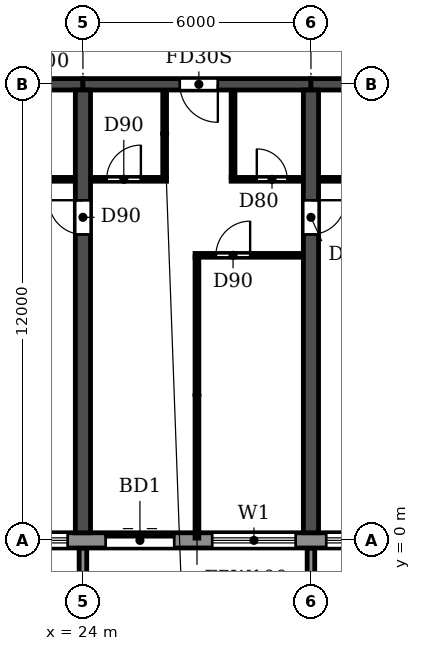
"""IFC4 building model, lengths in metres.
Left out: names, types, materials, properties, quantities, classifications, styles, units other than length and angle.
Written with IfcOpenShell. Run it as: python <this file> out.ifc"""

import sys

from ifc_helpers import new_model, si_unit, direction, frame, frame_2d, origin, place, context, subcontext, project, spatial, polyline, rectangle, outline, extrude, source, transform, mapped, element, fill, save


model = new_model("IFC4")
c1 = context("Model", 3, precision=1e-05, world=origin(), true_north=direction((0.0, 1.0)))
c2 = subcontext(c1, "Body", "Model", "MODEL_VIEW")
j1 = project(units=[si_unit("LENGTHUNIT", "METRE"), si_unit("PLANEANGLEUNIT", "RADIAN")], contexts=[c1])
p1 = place(None, origin())
s1 = spatial("IfcSite", under=j1, at=p1, CompositionType="ELEMENT")
p2 = place(p1, origin())
s2 = spatial("IfcBuilding", under=s1, at=p2, CompositionType="ELEMENT")
p3 = place(p2, frame((0.0, 0.0, 43.2)))
s3 = spatial("IfcBuildingStorey", under=s2, at=p3, CompositionType="ELEMENT", Elevation=43.2)
p4 = place(p3, frame((24.0, 0.2, 0.0), z_axis=(0.0, 0.0, 1.0), x_axis=(0.0, 1.0, 0.0)))
e1 = element("IfcWall", 1, at=p4, inside=s3, PredefinedType="SHEAR", context=c2, shape_type="SweptSolid", body=[
    extrude(rectangle(XDim=11.65, YDim=0.4, at=frame_2d((5.825, 0.0))), origin(), (0.0, 0.0, 1.0), 3.05),
])
p5 = place(p4, frame((7.85, 0.0, 0.0)))
e2 = element("IfcOpeningElement", 2, at=p5, cuts=e1, PredefinedType="OPENING", context=c2, shape_type="SweptSolid", body=[
    extrude(rectangle(XDim=0.9, YDim=2.1, at=frame_2d((0.45, 1.05))), frame((0.0, 0.21, 0.0), z_axis=(0.0, -1.0, 0.0), x_axis=(1.0, 0.0, 0.0)), (0.0, 0.0, 1.0), 0.42),
])
p6 = place(p3, frame((30.0, 0.2, 0.0), z_axis=(0.0, 0.0, 1.0), x_axis=(0.0, 1.0, 0.0)))
e3 = element("IfcWall", 3, at=p6, inside=s3, PredefinedType="SHEAR", context=c2, shape_type="SweptSolid", body=[
    extrude(rectangle(XDim=11.65, YDim=0.4, at=frame_2d((5.825, 0.0))), origin(), (0.0, 0.0, 1.0), 3.05),
])
p7 = place(p6, frame((7.85, 0.0, 0.0)))
e4 = element("IfcOpeningElement", 4, at=p7, cuts=e3, PredefinedType="OPENING", context=c2, shape_type="SweptSolid", body=[
    extrude(rectangle(XDim=0.9, YDim=2.1, at=frame_2d((0.45, 1.05))), frame((0.0, 0.21, 0.0), z_axis=(0.0, -1.0, 0.0), x_axis=(1.0, 0.0, 0.0)), (0.0, 0.0, 1.0), 0.42),
])
p8 = place(p3, frame((18.0, 12.0, 0.0), z_axis=(0.0, 0.0, 1.0), x_axis=(1.0, 0.0, 0.0)))
e5 = element("IfcWall", 5, at=p8, inside=s3, PredefinedType="SHEAR", context=c2, shape_type="SweptSolid", body=[
    extrude(rectangle(XDim=6.0, YDim=0.3, at=frame_2d((3.0, 0.0))), origin(), (0.0, 0.0, 1.0), 2.45),
])
p9 = place(p3, frame((24.0, 12.0, 0.0), z_axis=(0.0, 0.0, 1.0), x_axis=(1.0, 0.0, 0.0)))
e6 = element("IfcWall", 6, at=p9, inside=s3, PredefinedType="SHEAR", context=c2, shape_type="SweptSolid", body=[
    extrude(rectangle(XDim=6.0, YDim=0.3, at=frame_2d((3.0, 0.0))), origin(), (0.0, 0.0, 1.0), 2.45),
])
p10 = place(p9, frame((2.55, 0.0, 0.0)))
e7 = element("IfcOpeningElement", 7, at=p10, cuts=e6, PredefinedType="OPENING", context=c2, shape_type="SweptSolid", body=[
    extrude(rectangle(XDim=1.0, YDim=2.1, at=frame_2d((0.5, 1.05))), frame((0.0, 0.16, 0.0), z_axis=(0.0, -1.0, 0.0), x_axis=(1.0, 0.0, 0.0)), (0.0, 0.0, 1.0), 0.32),
])
p11 = place(p3, frame((30.0, 12.0, 0.0), z_axis=(0.0, 0.0, 1.0), x_axis=(1.0, 0.0, 0.0)))
e8 = element("IfcWall", 8, at=p11, inside=s3, PredefinedType="SHEAR", context=c2, shape_type="SweptSolid", body=[
    extrude(rectangle(XDim=6.0, YDim=0.3, at=frame_2d((3.0, 0.0))), origin(), (0.0, 0.0, 1.0), 2.45),
])
p12 = place(p3, frame((4.683, 0.0, 0.0), z_axis=(0.0, 0.0, 1.0), x_axis=(1.0, 0.0, 0.0)))
e9 = element("IfcWall", 9, at=p12, inside=s3, PredefinedType="STANDARD", context=c2, shape_type="SweptSolid", body=[
    extrude(rectangle(XDim=92.634, YDim=0.4, at=frame_2d((46.317, 0.0))), origin(), (0.0, 0.0, 1.0), 3.05),
])
p13 = place(p12, frame((1.717, 0.0, 0.9)))
e10 = element("IfcOpeningElement", 10, at=p13, cuts=e9, PredefinedType="OPENING", context=c2, shape_type="SweptSolid", body=[
    extrude(rectangle(XDim=2.2, YDim=1.5, at=frame_2d((1.1, 0.75))), frame((0.0, 0.21, 0.0), z_axis=(0.0, -1.0, 0.0), x_axis=(1.0, 0.0, 0.0)), (0.0, 0.0, 1.0), 0.42),
])
p14 = place(p12, frame((4.717, 0.0, 0.9)))
e11 = element("IfcOpeningElement", 11, at=p14, cuts=e9, PredefinedType="OPENING", context=c2, shape_type="SweptSolid", body=[
    extrude(rectangle(XDim=2.2, YDim=1.5, at=frame_2d((1.1, 0.75))), frame((0.0, 0.21, 0.0), z_axis=(0.0, -1.0, 0.0), x_axis=(1.0, 0.0, 0.0)), (0.0, 0.0, 1.0), 0.42),
])
p15 = place(p12, frame((7.717, 0.0, 0.9)))
e12 = element("IfcOpeningElement", 12, at=p15, cuts=e9, PredefinedType="OPENING", context=c2, shape_type="SweptSolid", body=[
    extrude(rectangle(XDim=2.2, YDim=1.5, at=frame_2d((1.1, 0.75))), frame((0.0, 0.21, 0.0), z_axis=(0.0, -1.0, 0.0), x_axis=(1.0, 0.0, 0.0)), (0.0, 0.0, 1.0), 0.42),
])
p16 = place(p12, frame((10.917, 0.0, 0.0)))
e13 = element("IfcOpeningElement", 13, at=p16, cuts=e9, PredefinedType="OPENING", context=c2, shape_type="SweptSolid", body=[
    extrude(rectangle(XDim=1.8, YDim=2.4, at=frame_2d((0.9, 1.2))), frame((0.0, 0.21, 0.0), z_axis=(0.0, -1.0, 0.0), x_axis=(1.0, 0.0, 0.0)), (0.0, 0.0, 1.0), 0.42),
])
p17 = place(p12, frame((13.717, 0.0, 0.9)))
e14 = element("IfcOpeningElement", 14, at=p17, cuts=e9, PredefinedType="OPENING", context=c2, shape_type="SweptSolid", body=[
    extrude(rectangle(XDim=2.2, YDim=1.5, at=frame_2d((1.1, 0.75))), frame((0.0, 0.21, 0.0), z_axis=(0.0, -1.0, 0.0), x_axis=(1.0, 0.0, 0.0)), (0.0, 0.0, 1.0), 0.42),
])
p18 = place(p12, frame((16.717, 0.0, 0.9)))
e15 = element("IfcOpeningElement", 15, at=p18, cuts=e9, PredefinedType="OPENING", context=c2, shape_type="SweptSolid", body=[
    extrude(rectangle(XDim=2.2, YDim=1.5, at=frame_2d((1.1, 0.75))), frame((0.0, 0.21, 0.0), z_axis=(0.0, -1.0, 0.0), x_axis=(1.0, 0.0, 0.0)), (0.0, 0.0, 1.0), 0.42),
])
p19 = place(p12, frame((19.917, 0.0, 0.0)))
e16 = element("IfcOpeningElement", 16, at=p19, cuts=e9, PredefinedType="OPENING", context=c2, shape_type="SweptSolid", body=[
    extrude(rectangle(XDim=1.8, YDim=2.4, at=frame_2d((0.9, 1.2))), frame((0.0, 0.21, 0.0), z_axis=(0.0, -1.0, 0.0), x_axis=(1.0, 0.0, 0.0)), (0.0, 0.0, 1.0), 0.42),
])
p20 = place(p12, frame((22.717, 0.0, 0.9)))
e17 = element("IfcOpeningElement", 17, at=p20, cuts=e9, PredefinedType="OPENING", context=c2, shape_type="SweptSolid", body=[
    extrude(rectangle(XDim=2.2, YDim=1.5, at=frame_2d((1.1, 0.75))), frame((0.0, 0.21, 0.0), z_axis=(0.0, -1.0, 0.0), x_axis=(1.0, 0.0, 0.0)), (0.0, 0.0, 1.0), 0.42),
])
p21 = place(p12, frame((25.717, 0.0, 0.9)))
e18 = element("IfcOpeningElement", 18, at=p21, cuts=e9, PredefinedType="OPENING", context=c2, shape_type="SweptSolid", body=[
    extrude(rectangle(XDim=2.2, YDim=1.5, at=frame_2d((1.1, 0.75))), frame((0.0, 0.21, 0.0), z_axis=(0.0, -1.0, 0.0), x_axis=(1.0, 0.0, 0.0)), (0.0, 0.0, 1.0), 0.42),
])
p22 = place(p12, frame((28.717, 0.0, 0.9)))
e19 = element("IfcOpeningElement", 19, at=p22, cuts=e9, PredefinedType="OPENING", context=c2, shape_type="SweptSolid", body=[
    extrude(rectangle(XDim=2.2, YDim=1.5, at=frame_2d((1.1, 0.75))), frame((0.0, 0.21, 0.0), z_axis=(0.0, -1.0, 0.0), x_axis=(1.0, 0.0, 0.0)), (0.0, 0.0, 1.0), 0.42),
])
p23 = place(p12, frame((31.717, 0.0, 0.9)))
e20 = element("IfcOpeningElement", 20, at=p23, cuts=e9, PredefinedType="OPENING", context=c2, shape_type="SweptSolid", body=[
    extrude(rectangle(XDim=2.2, YDim=1.5, at=frame_2d((1.1, 0.75))), frame((0.0, 0.21, 0.0), z_axis=(0.0, -1.0, 0.0), x_axis=(1.0, 0.0, 0.0)), (0.0, 0.0, 1.0), 0.42),
])
p24 = place(p12, frame((34.917, 0.0, 0.0)))
e21 = element("IfcOpeningElement", 21, at=p24, cuts=e9, PredefinedType="OPENING", context=c2, shape_type="SweptSolid", body=[
    extrude(rectangle(XDim=1.8, YDim=2.4, at=frame_2d((0.9, 1.2))), frame((0.0, 0.21, 0.0), z_axis=(0.0, -1.0, 0.0), x_axis=(1.0, 0.0, 0.0)), (0.0, 0.0, 1.0), 0.42),
])
p25 = place(p12, frame((37.717, 0.0, 0.9)))
e22 = element("IfcOpeningElement", 22, at=p25, cuts=e9, PredefinedType="OPENING", context=c2, shape_type="SweptSolid", body=[
    extrude(rectangle(XDim=2.2, YDim=1.5, at=frame_2d((1.1, 0.75))), frame((0.0, 0.21, 0.0), z_axis=(0.0, -1.0, 0.0), x_axis=(1.0, 0.0, 0.0)), (0.0, 0.0, 1.0), 0.42),
])
p26 = place(p12, frame((40.717, 0.0, 0.9)))
e23 = element("IfcOpeningElement", 23, at=p26, cuts=e9, PredefinedType="OPENING", context=c2, shape_type="SweptSolid", body=[
    extrude(rectangle(XDim=2.2, YDim=1.5, at=frame_2d((1.1, 0.75))), frame((0.0, 0.21, 0.0), z_axis=(0.0, -1.0, 0.0), x_axis=(1.0, 0.0, 0.0)), (0.0, 0.0, 1.0), 0.42),
])
p27 = place(p12, frame((43.717, 0.0, 0.9)))
e24 = element("IfcOpeningElement", 24, at=p27, cuts=e9, PredefinedType="OPENING", context=c2, shape_type="SweptSolid", body=[
    extrude(rectangle(XDim=2.2, YDim=1.5, at=frame_2d((1.1, 0.75))), frame((0.0, 0.21, 0.0), z_axis=(0.0, -1.0, 0.0), x_axis=(1.0, 0.0, 0.0)), (0.0, 0.0, 1.0), 0.42),
])
p28 = place(p12, frame((46.917, 0.0, 0.0)))
e25 = element("IfcOpeningElement", 25, at=p28, cuts=e9, PredefinedType="OPENING", context=c2, shape_type="SweptSolid", body=[
    extrude(rectangle(XDim=1.8, YDim=2.4, at=frame_2d((0.9, 1.2))), frame((0.0, 0.21, 0.0), z_axis=(0.0, -1.0, 0.0), x_axis=(1.0, 0.0, 0.0)), (0.0, 0.0, 1.0), 0.42),
])
p29 = place(p12, frame((49.717, 0.0, 0.9)))
e26 = element("IfcOpeningElement", 26, at=p29, cuts=e9, PredefinedType="OPENING", context=c2, shape_type="SweptSolid", body=[
    extrude(rectangle(XDim=2.2, YDim=1.5, at=frame_2d((1.1, 0.75))), frame((0.0, 0.21, 0.0), z_axis=(0.0, -1.0, 0.0), x_axis=(1.0, 0.0, 0.0)), (0.0, 0.0, 1.0), 0.42),
])
p30 = place(p12, frame((52.717, 0.0, 0.9)))
e27 = element("IfcOpeningElement", 27, at=p30, cuts=e9, PredefinedType="OPENING", context=c2, shape_type="SweptSolid", body=[
    extrude(rectangle(XDim=2.2, YDim=1.5, at=frame_2d((1.1, 0.75))), frame((0.0, 0.21, 0.0), z_axis=(0.0, -1.0, 0.0), x_axis=(1.0, 0.0, 0.0)), (0.0, 0.0, 1.0), 0.42),
])
p31 = place(p12, frame((55.717, 0.0, 0.9)))
e28 = element("IfcOpeningElement", 28, at=p31, cuts=e9, PredefinedType="OPENING", context=c2, shape_type="SweptSolid", body=[
    extrude(rectangle(XDim=2.2, YDim=1.5, at=frame_2d((1.1, 0.75))), frame((0.0, 0.21, 0.0), z_axis=(0.0, -1.0, 0.0), x_axis=(1.0, 0.0, 0.0)), (0.0, 0.0, 1.0), 0.42),
])
p32 = place(p12, frame((58.917, 0.0, 0.0)))
e29 = element("IfcOpeningElement", 29, at=p32, cuts=e9, PredefinedType="OPENING", context=c2, shape_type="SweptSolid", body=[
    extrude(rectangle(XDim=1.8, YDim=2.4, at=frame_2d((0.9, 1.2))), frame((0.0, 0.21, 0.0), z_axis=(0.0, -1.0, 0.0), x_axis=(1.0, 0.0, 0.0)), (0.0, 0.0, 1.0), 0.42),
])
p33 = place(p12, frame((61.717, 0.0, 0.9)))
e30 = element("IfcOpeningElement", 30, at=p33, cuts=e9, PredefinedType="OPENING", context=c2, shape_type="SweptSolid", body=[
    extrude(rectangle(XDim=2.2, YDim=1.5, at=frame_2d((1.1, 0.75))), frame((0.0, 0.21, 0.0), z_axis=(0.0, -1.0, 0.0), x_axis=(1.0, 0.0, 0.0)), (0.0, 0.0, 1.0), 0.42),
])
p34 = place(p12, frame((64.717, 0.0, 0.9)))
e31 = element("IfcOpeningElement", 31, at=p34, cuts=e9, PredefinedType="OPENING", context=c2, shape_type="SweptSolid", body=[
    extrude(rectangle(XDim=2.2, YDim=1.5, at=frame_2d((1.1, 0.75))), frame((0.0, 0.21, 0.0), z_axis=(0.0, -1.0, 0.0), x_axis=(1.0, 0.0, 0.0)), (0.0, 0.0, 1.0), 0.42),
])
p35 = place(p12, frame((67.717, 0.0, 0.9)))
e32 = element("IfcOpeningElement", 32, at=p35, cuts=e9, PredefinedType="OPENING", context=c2, shape_type="SweptSolid", body=[
    extrude(rectangle(XDim=2.2, YDim=1.5, at=frame_2d((1.1, 0.75))), frame((0.0, 0.21, 0.0), z_axis=(0.0, -1.0, 0.0), x_axis=(1.0, 0.0, 0.0)), (0.0, 0.0, 1.0), 0.42),
])
p36 = place(p12, frame((70.917, 0.0, 0.0)))
e33 = element("IfcOpeningElement", 33, at=p36, cuts=e9, PredefinedType="OPENING", context=c2, shape_type="SweptSolid", body=[
    extrude(rectangle(XDim=1.8, YDim=2.4, at=frame_2d((0.9, 1.2))), frame((0.0, 0.21, 0.0), z_axis=(0.0, -1.0, 0.0), x_axis=(1.0, 0.0, 0.0)), (0.0, 0.0, 1.0), 0.42),
])
p37 = place(p12, frame((73.717, 0.0, 0.9)))
e34 = element("IfcOpeningElement", 34, at=p37, cuts=e9, PredefinedType="OPENING", context=c2, shape_type="SweptSolid", body=[
    extrude(rectangle(XDim=2.2, YDim=1.5, at=frame_2d((1.1, 0.75))), frame((0.0, 0.21, 0.0), z_axis=(0.0, -1.0, 0.0), x_axis=(1.0, 0.0, 0.0)), (0.0, 0.0, 1.0), 0.42),
])
p38 = place(p12, frame((76.717, 0.0, 0.9)))
e35 = element("IfcOpeningElement", 35, at=p38, cuts=e9, PredefinedType="OPENING", context=c2, shape_type="SweptSolid", body=[
    extrude(rectangle(XDim=2.2, YDim=1.5, at=frame_2d((1.1, 0.75))), frame((0.0, 0.21, 0.0), z_axis=(0.0, -1.0, 0.0), x_axis=(1.0, 0.0, 0.0)), (0.0, 0.0, 1.0), 0.42),
])
p39 = place(p12, frame((79.717, 0.0, 0.9)))
e36 = element("IfcOpeningElement", 36, at=p39, cuts=e9, PredefinedType="OPENING", context=c2, shape_type="SweptSolid", body=[
    extrude(rectangle(XDim=2.2, YDim=1.5, at=frame_2d((1.1, 0.75))), frame((0.0, 0.21, 0.0), z_axis=(0.0, -1.0, 0.0), x_axis=(1.0, 0.0, 0.0)), (0.0, 0.0, 1.0), 0.42),
])
p40 = place(p12, frame((82.917, 0.0, 0.0)))
e37 = element("IfcOpeningElement", 37, at=p40, cuts=e9, PredefinedType="OPENING", context=c2, shape_type="SweptSolid", body=[
    extrude(rectangle(XDim=1.8, YDim=2.4, at=frame_2d((0.9, 1.2))), frame((0.0, 0.21, 0.0), z_axis=(0.0, -1.0, 0.0), x_axis=(1.0, 0.0, 0.0)), (0.0, 0.0, 1.0), 0.42),
])
p41 = place(p12, frame((85.717, 0.0, 0.9)))
e38 = element("IfcOpeningElement", 38, at=p41, cuts=e9, PredefinedType="OPENING", context=c2, shape_type="SweptSolid", body=[
    extrude(rectangle(XDim=2.2, YDim=1.5, at=frame_2d((1.1, 0.75))), frame((0.0, 0.21, 0.0), z_axis=(0.0, -1.0, 0.0), x_axis=(1.0, 0.0, 0.0)), (0.0, 0.0, 1.0), 0.42),
])
p42 = place(p12, frame((88.717, 0.0, 0.9)))
e39 = element("IfcOpeningElement", 39, at=p42, cuts=e9, PredefinedType="OPENING", context=c2, shape_type="SweptSolid", body=[
    extrude(rectangle(XDim=2.2, YDim=1.5, at=frame_2d((1.1, 0.75))), frame((0.0, 0.21, 0.0), z_axis=(0.0, -1.0, 0.0), x_axis=(1.0, 0.0, 0.0)), (0.0, 0.0, 1.0), 0.42),
])
m1 = source(origin(), c2, "Body", "SweptSolid", [
    extrude(outline(polyline([(0.0, 0.0), (0.2, 0.0), (0.2, 1.65), (0.0, 1.65), (0.0, 0.0)])), origin(), (0.0, 0.0, 1.0), 3.1),
])
for number, where in (
    (40, (23.9, -1.85, 0.0)),
    (41, (29.9, -1.85, 0.0)),
):
    element("IfcWall", number, at=place(p3, frame(where)), inside=s3, PredefinedType="STANDARD", context=c2, shape_type="MappedRepresentation", body=[
        mapped(m1, transform((0.0, 0.0, 0.0))),
    ])
p43 = place(p3, frame((26.95, 7.5, 0.0), z_axis=(0.0, 0.0, 1.0), x_axis=(1.0, 0.0, 0.0)))
e42 = element("IfcWall", 42, at=p43, inside=s3, PredefinedType="PARTITIONING", context=c2, shape_type="SweptSolid", body=[
    extrude(rectangle(XDim=2.84, YDim=0.1, at=frame_2d((1.42, 0.0))), origin(), (0.0, 0.0, 1.0), 3.05),
])
p44 = place(p43, frame((0.55, 0.0, 0.0)))
e43 = element("IfcOpeningElement", 43, at=p44, cuts=e42, PredefinedType="OPENING", context=c2, shape_type="SweptSolid", body=[
    extrude(rectangle(XDim=0.9, YDim=2.1, at=frame_2d((0.45, 1.05))), frame((0.0, 0.06, 0.0), z_axis=(0.0, -1.0, 0.0), x_axis=(1.0, 0.0, 0.0)), (0.0, 0.0, 1.0), 0.12),
])
p45 = place(p3, frame((21.1, 9.5, 0.0), z_axis=(0.0, 0.0, 1.0), x_axis=(1.0, 0.0, 0.0)))
e44 = element("IfcWall", 44, at=p45, inside=s3, PredefinedType="PARTITIONING", context=c2, shape_type="SweptSolid", body=[
    extrude(rectangle(XDim=2.69, YDim=0.1, at=frame_2d((1.345, 0.0))), origin(), (0.0, 0.0, 1.0), 3.05),
])
p46 = place(p45, frame((1.0, 0.0, 0.0)))
e45 = element("IfcOpeningElement", 45, at=p46, cuts=e44, PredefinedType="OPENING", context=c2, shape_type="SweptSolid", body=[
    extrude(rectangle(XDim=0.8, YDim=2.1, at=frame_2d((0.4, 1.05))), frame((0.0, 0.06, 0.0), z_axis=(0.0, -1.0, 0.0), x_axis=(1.0, 0.0, 0.0)), (0.0, 0.0, 1.0), 0.12),
])
p47 = place(p3, frame((24.21, 9.5, 0.0), z_axis=(0.0, 0.0, 1.0), x_axis=(1.0, 0.0, 0.0)))
e46 = element("IfcWall", 46, at=p47, inside=s3, PredefinedType="PARTITIONING", context=c2, shape_type="SweptSolid", body=[
    extrude(rectangle(XDim=1.99, YDim=0.1, at=frame_2d((0.995, 0.0))), origin(), (0.0, 0.0, 1.0), 3.05),
])
p48 = place(p47, frame((0.415, 0.0, 0.0)))
e47 = element("IfcOpeningElement", 47, at=p48, cuts=e46, PredefinedType="OPENING", context=c2, shape_type="SweptSolid", body=[
    extrude(rectangle(XDim=0.9, YDim=2.1, at=frame_2d((0.45, 1.05))), frame((0.0, 0.06, 0.0), z_axis=(0.0, -1.0, 0.0), x_axis=(1.0, 0.0, 0.0)), (0.0, 0.0, 1.0), 0.12),
])
p49 = place(p3, frame((27.9, 9.5, 0.0), z_axis=(0.0, 0.0, 1.0), x_axis=(1.0, 0.0, 0.0)))
e48 = element("IfcWall", 48, at=p49, inside=s3, PredefinedType="PARTITIONING", context=c2, shape_type="SweptSolid", body=[
    extrude(rectangle(XDim=1.89, YDim=0.1, at=frame_2d((0.945, 0.0))), origin(), (0.0, 0.0, 1.0), 3.05),
])
p50 = place(p49, frame((0.675, 0.0, 0.0)))
e49 = element("IfcOpeningElement", 49, at=p50, cuts=e48, PredefinedType="OPENING", context=c2, shape_type="SweptSolid", body=[
    extrude(rectangle(XDim=0.8, YDim=2.1, at=frame_2d((0.4, 1.05))), frame((0.0, 0.06, 0.0), z_axis=(0.0, -1.0, 0.0), x_axis=(1.0, 0.0, 0.0)), (0.0, 0.0, 1.0), 0.12),
])
p51 = place(p3, frame((30.21, 9.5, 0.0), z_axis=(0.0, 0.0, 1.0), x_axis=(1.0, 0.0, 0.0)))
e50 = element("IfcWall", 50, at=p51, inside=s3, PredefinedType="PARTITIONING", context=c2, shape_type="SweptSolid", body=[
    extrude(rectangle(XDim=2.69, YDim=0.1, at=frame_2d((1.345, 0.0))), origin(), (0.0, 0.0, 1.0), 3.05),
])
p52 = place(p51, frame((0.89, 0.0, 0.0)))
e51 = element("IfcOpeningElement", 51, at=p52, cuts=e50, PredefinedType="OPENING", context=c2, shape_type="SweptSolid", body=[
    extrude(rectangle(XDim=0.8, YDim=2.1, at=frame_2d((0.4, 1.05))), frame((0.0, 0.06, 0.0), z_axis=(0.0, -1.0, 0.0), x_axis=(1.0, 0.0, 0.0)), (0.0, 0.0, 1.0), 0.12),
])
p53 = place(p3, frame((26.15, 9.55, 0.0), z_axis=(0.0, 0.0, 1.0), x_axis=(0.0, 1.0, 0.0)))
e52 = element("IfcWall", 52, at=p53, inside=s3, PredefinedType="PARTITIONING", context=c2, shape_type="SweptSolid", body=[
    extrude(rectangle(XDim=2.29, YDim=0.1, at=frame_2d((1.145, 0.0))), origin(), (0.0, 0.0, 1.0), 3.05),
])
p54 = place(p3, frame((27.0, 0.06, 0.0), z_axis=(0.0, 0.0, 1.0), x_axis=(0.0, 1.0, 0.0)))
e53 = element("IfcWall", 53, at=p54, inside=s3, PredefinedType="PARTITIONING", context=c2, shape_type="SweptSolid", body=[
    extrude(rectangle(XDim=7.39, YDim=0.1, at=frame_2d((3.695, 0.0))), origin(), (0.0, 0.0, 1.0), 3.05),
])
p55 = place(p3, frame((27.95, 9.55, 0.0), z_axis=(0.0, 0.0, 1.0), x_axis=(0.0, 1.0, 0.0)))
e54 = element("IfcWall", 54, at=p55, inside=s3, PredefinedType="PARTITIONING", context=c2, shape_type="SweptSolid", body=[
    extrude(rectangle(XDim=2.29, YDim=0.1, at=frame_2d((1.145, 0.0))), origin(), (0.0, 0.0, 1.0), 3.05),
])
p56 = place(p18, origin())
e55 = element("IfcWindow", 55, at=p56, inside=s3, PartitioningType="DOUBLE_PANEL_HORIZONTAL", PredefinedType="WINDOW", context=c2, shape_type="SweptSolid", body=[
    extrude(rectangle(XDim=2.2, YDim=1.5, at=frame_2d((1.1, 0.75))), frame((0.0, 0.03, 0.0), z_axis=(0.0, -1.0, 0.0), x_axis=(1.0, 0.0, 0.0)), (0.0, 0.0, 1.0), 0.06),
])
fill(e15, e55)
p57 = place(p19, origin())
e56 = element("IfcDoor", 56, at=p57, inside=s3, OperationType="DOUBLE_DOOR_SLIDING", PredefinedType="DOOR", context=c2, shape_type="SweptSolid", body=[
    extrude(rectangle(XDim=1.8, YDim=2.4, at=frame_2d((0.9, 1.2))), frame((0.0, 0.025, 0.0), z_axis=(0.0, -1.0, 0.0), x_axis=(1.0, 0.0, 0.0)), (0.0, 0.0, 1.0), 0.05),
])
fill(e16, e56)
p58 = place(p20, origin())
e57 = element("IfcWindow", 57, at=p58, inside=s3, PartitioningType="DOUBLE_PANEL_HORIZONTAL", PredefinedType="WINDOW", context=c2, shape_type="SweptSolid", body=[
    extrude(rectangle(XDim=2.2, YDim=1.5, at=frame_2d((1.1, 0.75))), frame((0.0, 0.03, 0.0), z_axis=(0.0, -1.0, 0.0), x_axis=(1.0, 0.0, 0.0)), (0.0, 0.0, 1.0), 0.06),
])
fill(e17, e57)
p59 = place(p21, origin())
e58 = element("IfcWindow", 58, at=p59, inside=s3, PartitioningType="DOUBLE_PANEL_HORIZONTAL", PredefinedType="WINDOW", context=c2, shape_type="SweptSolid", body=[
    extrude(rectangle(XDim=2.2, YDim=1.5, at=frame_2d((1.1, 0.75))), frame((0.0, 0.03, 0.0), z_axis=(0.0, -1.0, 0.0), x_axis=(1.0, 0.0, 0.0)), (0.0, 0.0, 1.0), 0.06),
])
fill(e18, e58)
p60 = place(p5, origin())
e59 = element("IfcDoor", 59, at=p60, inside=s3, OperationType="SINGLE_SWING_RIGHT", PredefinedType="DOOR", context=c2, shape_type="SweptSolid", body=[
    extrude(rectangle(XDim=0.9, YDim=2.1, at=frame_2d((0.45, 1.05))), frame((0.0, 0.025, 0.0), z_axis=(0.0, -1.0, 0.0), x_axis=(1.0, 0.0, 0.0)), (0.0, 0.0, 1.0), 0.05),
])
fill(e2, e59)
p61 = place(p48, origin())
e60 = element("IfcDoor", 60, at=p61, inside=s3, OperationType="SINGLE_SWING_RIGHT", PredefinedType="DOOR", context=c2, shape_type="SweptSolid", body=[
    extrude(rectangle(XDim=0.9, YDim=2.1, at=frame_2d((0.45, 1.05))), frame((0.0, 0.025, 0.0), z_axis=(0.0, -1.0, 0.0), x_axis=(1.0, 0.0, 0.0)), (0.0, 0.0, 1.0), 0.05),
])
fill(e47, e60)
p62 = place(p10, frame((1.0, 0.0, 0.0), z_axis=(0.0, 0.0, 1.0), x_axis=(-1.0, 0.0, 0.0)))
e61 = element("IfcDoor", 61, at=p62, inside=s3, OperationType="SINGLE_SWING_LEFT", PredefinedType="DOOR", context=c2, shape_type="SweptSolid", body=[
    extrude(rectangle(XDim=1.0, YDim=2.1, at=frame_2d((0.5, 1.05))), frame((0.0, 0.025, 0.0), z_axis=(0.0, -1.0, 0.0), x_axis=(1.0, 0.0, 0.0)), (0.0, 0.0, 1.0), 0.05),
])
fill(e7, e61)
p63 = place(p44, origin())
e62 = element("IfcDoor", 62, at=p63, inside=s3, OperationType="SINGLE_SWING_RIGHT", PredefinedType="DOOR", context=c2, shape_type="SweptSolid", body=[
    extrude(rectangle(XDim=0.9, YDim=2.1, at=frame_2d((0.45, 1.05))), frame((0.0, 0.025, 0.0), z_axis=(0.0, -1.0, 0.0), x_axis=(1.0, 0.0, 0.0)), (0.0, 0.0, 1.0), 0.05),
])
fill(e43, e62)
p64 = place(p50, origin())
e63 = element("IfcDoor", 63, at=p64, inside=s3, OperationType="SINGLE_SWING_LEFT", PredefinedType="DOOR", context=c2, shape_type="SweptSolid", body=[
    extrude(rectangle(XDim=0.8, YDim=2.1, at=frame_2d((0.4, 1.05))), frame((0.0, 0.025, 0.0), z_axis=(0.0, -1.0, 0.0), x_axis=(1.0, 0.0, 0.0)), (0.0, 0.0, 1.0), 0.05),
])
fill(e49, e63)
p65 = place(p7, frame((0.9, 0.0, 0.0), z_axis=(0.0, 0.0, 1.0), x_axis=(-1.0, 0.0, 0.0)))
e64 = element("IfcDoor", 64, at=p65, inside=s3, OperationType="SINGLE_SWING_LEFT", PredefinedType="DOOR", context=c2, shape_type="SweptSolid", body=[
    extrude(rectangle(XDim=0.9, YDim=2.1, at=frame_2d((0.45, 1.05))), frame((0.0, 0.025, 0.0), z_axis=(0.0, -1.0, 0.0), x_axis=(1.0, 0.0, 0.0)), (0.0, 0.0, 1.0), 0.05),
])
fill(e4, e64)
save(model, sys.argv[1])
